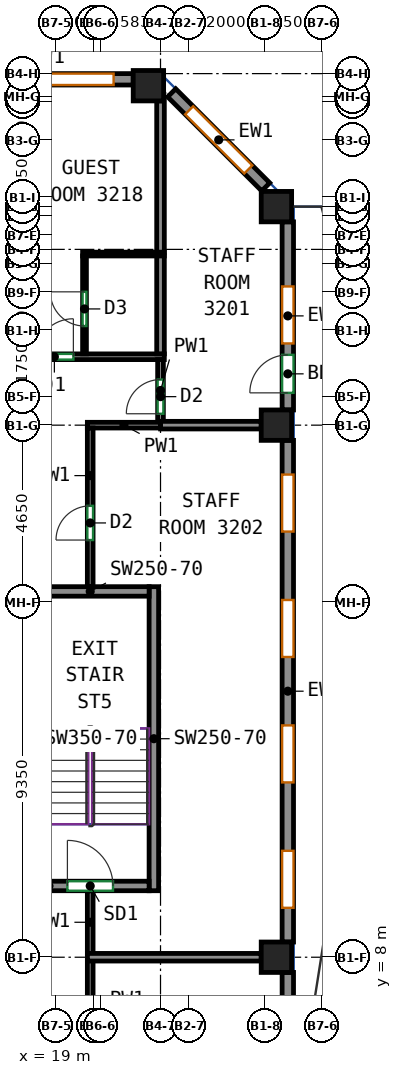
"""IFC4 building model, lengths in metres.
Left out: names, types, materials, properties, quantities, classifications, styles, units other than length and angle.
Written with IfcOpenShell. Run it as: python <this file> out.ifc"""

import sys

from ifc_helpers import new_model, si_unit, direction, frame, frame_2d, origin, origin_2d, place, context, subcontext, project, spatial, rectangle, extrude, source, transform, mapped, element, fill, save


model = new_model("IFC4")
c1 = context("Model", 3, precision=1e-05, world=origin(), true_north=direction((0.0, 1.0)))
c2 = subcontext(c1, "Body", "Model", "MODEL_VIEW")
j1 = project(units=[si_unit("LENGTHUNIT", "METRE"), si_unit("PLANEANGLEUNIT", "RADIAN")], contexts=[c1])
p1 = place(None, origin())
s1 = spatial("IfcSite", under=j1, at=p1, CompositionType="ELEMENT")
p2 = place(p1, origin())
s2 = spatial("IfcBuilding", under=s1, at=p2, CompositionType="ELEMENT")
p3 = place(p2, frame((0.0, 0.0, 143.9)))
s3 = spatial("IfcBuildingStorey", under=s2, at=p3, CompositionType="ELEMENT", Elevation=143.9)
m1 = source(origin(), c2, "Body", "SweptSolid", [
    extrude(rectangle(XDim=0.8, YDim=0.8, at=origin_2d()), origin(), (0.0, 0.0, 1.0), 3.12),
])
for number, where, z_axis, x_axis in (
    (1, (21.432, 30.932, 0.0), (0.0, 0.0, 1.0), (1.0, 0.0, 0.0)),
    (2, (24.8, 8.0, 0.0), (0.0, 0.0, 1.0), (1.0, 0.0, 0.0)),
    (3, (24.8, 22.0, 0.0), (0.0, 0.0, 1.0), (1.0, 0.0, 0.0)),
    (4, (24.8, 27.75, 0.0), (0.0, 0.0, 1.0), (1.0, 0.0, 0.0)),
):
    element("IfcColumn", number, at=place(p3, frame(where, z_axis=z_axis, x_axis=x_axis)), inside=s3, PredefinedType="COLUMN", context=c2, shape_type="MappedRepresentation", body=[
        mapped(m1, transform((0.0, 0.0, 0.0))),
    ])
m2 = source(origin(), c2, "Body", "SweptSolid", [
    extrude(rectangle(XDim=8.0, YDim=0.25, at=frame_2d((4.0, 0.0))), origin(), (0.0, 0.0, 1.0), 3.12),
])
p4 = place(p3, frame((21.575, 9.75, 0.0), z_axis=(0.0, 0.0, 1.0), x_axis=(0.0, 1.0, 0.0)))
e5 = element("IfcWall", 5, at=p4, inside=s3, PredefinedType="SHEAR", context=c2, shape_type="MappedRepresentation", body=[
    mapped(m2, transform((0.0, 0.0, 0.0))),
])
m3 = source(origin(), c2, "Body", "SweptSolid", [
    extrude(rectangle(XDim=3.1, YDim=0.25, at=frame_2d((1.55, 0.0))), origin(), (0.0, 0.0, 1.0), 3.12),
])
p5 = place(p3, frame((18.35, 9.875, 0.0), z_axis=(0.0, 0.0, 1.0), x_axis=(1.0, 0.0, 0.0)))
e6 = element("IfcWall", 6, at=p5, inside=s3, PredefinedType="SHEAR", context=c2, shape_type="MappedRepresentation", body=[
    mapped(m3, transform((0.0, 0.0, 0.0))),
])
p6 = place(p5, frame((0.95, 0.0, 0.0)))
e7 = element("IfcOpeningElement", 7, at=p6, cuts=e6, PredefinedType="OPENING", context=c2, shape_type="SweptSolid", body=[
    extrude(rectangle(XDim=1.2, YDim=2.1, at=frame_2d((0.6, 1.05))), frame((0.0, 0.135, 0.0), z_axis=(0.0, -1.0, 0.0), x_axis=(1.0, 0.0, 0.0)), (0.0, 0.0, 1.0), 0.27),
])
p7 = place(p3, frame((18.35, 17.625, 0.0), z_axis=(0.0, 0.0, 1.0), x_axis=(1.0, 0.0, 0.0)))
e8 = element("IfcWall", 8, at=p7, inside=s3, PredefinedType="SHEAR", context=c2, shape_type="MappedRepresentation", body=[
    mapped(m3, transform((0.0, 0.0, 0.0))),
])
m4 = source(origin(), c2, "Body", "SweptSolid", [
    extrude(rectangle(XDim=6.513, YDim=0.3, at=frame_2d((3.256, 0.0))), origin(), (0.0, 0.0, 1.0), 3.12),
])
p8 = place(p3, frame((25.1, 1.087, 0.0), z_axis=(0.0, 0.0, 1.0), x_axis=(0.0, 1.0, 0.0)))
e9 = element("IfcWall", 9, at=p8, inside=s3, PredefinedType="SOLIDWALL", context=c2, shape_type="MappedRepresentation", body=[
    mapped(m4, transform((0.0, 0.0, 0.0))),
])
p9 = place(p8, frame((0.878, 0.0, 0.85)))
e10 = element("IfcOpeningElement", 10, at=p9, cuts=e9, PredefinedType="OPENING", context=c2, shape_type="SweptSolid", body=[
    extrude(rectangle(XDim=1.5, YDim=1.95, at=frame_2d((0.75, 0.975))), frame((0.0, 0.16, 0.0), z_axis=(0.0, -1.0, 0.0), x_axis=(1.0, 0.0, 0.0)), (0.0, 0.0, 1.0), 0.32),
])
p10 = place(p8, frame((4.135, 0.0, 0.85)))
e11 = element("IfcOpeningElement", 11, at=p10, cuts=e9, PredefinedType="OPENING", context=c2, shape_type="SweptSolid", body=[
    extrude(rectangle(XDim=1.5, YDim=1.95, at=frame_2d((0.75, 0.975))), frame((0.0, 0.16, 0.0), z_axis=(0.0, -1.0, 0.0), x_axis=(1.0, 0.0, 0.0)), (0.0, 0.0, 1.0), 0.32),
])
m5 = source(origin(), c2, "Body", "SweptSolid", [
    extrude(rectangle(XDim=13.2, YDim=0.3, at=frame_2d((6.6, 0.0))), origin(), (0.0, 0.0, 1.0), 3.12),
])
p11 = place(p3, frame((25.1, 8.4, 0.0), z_axis=(0.0, 0.0, 1.0), x_axis=(0.0, 1.0, 0.0)))
e12 = element("IfcWall", 12, at=p11, inside=s3, PredefinedType="SOLIDWALL", context=c2, shape_type="MappedRepresentation", body=[
    mapped(m5, transform((0.0, 0.0, 0.0))),
])
p12 = place(p11, frame((0.9, 0.0, 0.85)))
e13 = element("IfcOpeningElement", 13, at=p12, cuts=e12, PredefinedType="OPENING", context=c2, shape_type="SweptSolid", body=[
    extrude(rectangle(XDim=1.5, YDim=1.95, at=frame_2d((0.75, 0.975))), frame((0.0, 0.16, 0.0), z_axis=(0.0, -1.0, 0.0), x_axis=(1.0, 0.0, 0.0)), (0.0, 0.0, 1.0), 0.32),
])
p13 = place(p11, frame((4.2, 0.0, 0.85)))
e14 = element("IfcOpeningElement", 14, at=p13, cuts=e12, PredefinedType="OPENING", context=c2, shape_type="SweptSolid", body=[
    extrude(rectangle(XDim=1.5, YDim=1.95, at=frame_2d((0.75, 0.975))), frame((0.0, 0.16, 0.0), z_axis=(0.0, -1.0, 0.0), x_axis=(1.0, 0.0, 0.0)), (0.0, 0.0, 1.0), 0.32),
])
p14 = place(p11, frame((7.5, 0.0, 0.85)))
e15 = element("IfcOpeningElement", 15, at=p14, cuts=e12, PredefinedType="OPENING", context=c2, shape_type="SweptSolid", body=[
    extrude(rectangle(XDim=1.5, YDim=1.95, at=frame_2d((0.75, 0.975))), frame((0.0, 0.16, 0.0), z_axis=(0.0, -1.0, 0.0), x_axis=(1.0, 0.0, 0.0)), (0.0, 0.0, 1.0), 0.32),
])
p15 = place(p11, frame((10.8, 0.0, 0.85)))
e16 = element("IfcOpeningElement", 16, at=p15, cuts=e12, PredefinedType="OPENING", context=c2, shape_type="SweptSolid", body=[
    extrude(rectangle(XDim=1.5, YDim=1.95, at=frame_2d((0.75, 0.975))), frame((0.0, 0.16, 0.0), z_axis=(0.0, -1.0, 0.0), x_axis=(1.0, 0.0, 0.0)), (0.0, 0.0, 1.0), 0.32),
])
m6 = source(origin(), c2, "Body", "SweptSolid", [
    extrude(rectangle(XDim=4.95, YDim=0.3, at=frame_2d((2.475, 0.0))), origin(), (0.0, 0.0, 1.0), 3.12),
])
p16 = place(p3, frame((25.1, 22.4, 0.0), z_axis=(0.0, 0.0, 1.0), x_axis=(0.0, 1.0, 0.0)))
e17 = element("IfcWall", 17, at=p16, inside=s3, PredefinedType="SOLIDWALL", context=c2, shape_type="MappedRepresentation", body=[
    mapped(m6, transform((0.0, 0.0, 0.0))),
])
p17 = place(p16, frame((1.75, 0.0, 0.85)))
e18 = element("IfcOpeningElement", 18, at=p17, cuts=e17, PredefinedType="OPENING", context=c2, shape_type="SweptSolid", body=[
    extrude(rectangle(XDim=1.5, YDim=1.95, at=frame_2d((0.75, 0.975))), frame((0.0, 0.16, 0.0), z_axis=(0.0, -1.0, 0.0), x_axis=(1.0, 0.0, 0.0)), (0.0, 0.0, 1.0), 0.32),
])
p18 = place(p16, frame((0.45, 0.0, 0.0)))
e19 = element("IfcOpeningElement", 19, at=p18, cuts=e17, PredefinedType="OPENING", context=c2, shape_type="SweptSolid", body=[
    extrude(rectangle(XDim=1.0, YDim=2.1, at=frame_2d((0.5, 1.05))), frame((0.0, 0.16, 0.0), z_axis=(0.0, -1.0, 0.0), x_axis=(1.0, 0.0, 0.0)), (0.0, 0.0, 1.0), 0.32),
])
m7 = source(origin(), c2, "Body", "SweptSolid", [
    extrude(rectangle(XDim=3.5, YDim=0.3, at=frame_2d((1.75, 0.0))), origin(), (0.0, 0.0, 1.0), 3.12),
])
p19 = place(p3, frame((24.519, 28.269, 0.0), z_axis=(0.0, 0.0, 1.0), x_axis=(-0.70707190453, 0.707141656123, 0.0)))
e20 = element("IfcWall", 20, at=p19, inside=s3, PredefinedType="SOLIDWALL", context=c2, shape_type="MappedRepresentation", body=[
    mapped(m7, transform((0.0, 0.0, 0.0))),
])
p20 = place(p19, frame((0.65, 0.0, 0.85)))
e21 = element("IfcOpeningElement", 21, at=p20, cuts=e20, PredefinedType="OPENING", context=c2, shape_type="SweptSolid", body=[
    extrude(rectangle(XDim=2.2, YDim=1.95, at=frame_2d((1.1, 0.975))), frame((0.0, 0.16, 0.0), z_axis=(0.0, -1.0, 0.0), x_axis=(1.0, 0.0, 0.0)), (0.0, 0.0, 1.0), 0.32),
])
m8 = source(origin(), c2, "Body", "SweptSolid", [
    extrude(rectangle(XDim=6.465, YDim=0.3, at=frame_2d((3.232, 0.0))), origin(), (0.0, 0.0, 1.0), 3.12),
])
p21 = place(p3, frame((21.032, 31.1, 0.0), z_axis=(0.0, 0.0, 1.0), x_axis=(-1.0, 0.0, 0.0)))
e22 = element("IfcWall", 22, at=p21, inside=s3, PredefinedType="SOLIDWALL", context=c2, shape_type="MappedRepresentation", body=[
    mapped(m8, transform((0.0, 0.0, 0.0))),
])
p22 = place(p21, frame((0.516, 0.0, 0.85)))
e23 = element("IfcOpeningElement", 23, at=p22, cuts=e22, PredefinedType="OPENING", context=c2, shape_type="SweptSolid", body=[
    extrude(rectangle(XDim=2.2, YDim=1.95, at=frame_2d((1.1, 0.975))), frame((0.0, 0.16, 0.0), z_axis=(0.0, -1.0, 0.0), x_axis=(1.0, 0.0, 0.0)), (0.0, 0.0, 1.0), 0.32),
])
p23 = place(p21, frame((3.749, 0.0, 0.85)))
e24 = element("IfcOpeningElement", 24, at=p23, cuts=e22, PredefinedType="OPENING", context=c2, shape_type="SweptSolid", body=[
    extrude(rectangle(XDim=2.2, YDim=1.95, at=frame_2d((1.1, 0.975))), frame((0.0, 0.16, 0.0), z_axis=(0.0, -1.0, 0.0), x_axis=(1.0, 0.0, 0.0)), (0.0, 0.0, 1.0), 0.32),
])
p24 = place(p3, frame((-20.059, 23.8, 0.0), z_axis=(0.0, 0.0, 1.0), x_axis=(1.0, 0.0, 0.0)))
e25 = element("IfcWall", 25, at=p24, inside=s3, PredefinedType="PARTITIONING", context=c2, shape_type="SweptSolid", body=[
    extrude(rectangle(XDim=41.909, YDim=0.15, at=frame_2d((20.955, 0.0))), origin(), (0.0, 0.0, 1.0), 3.12),
])
p25 = place(p24, frame((0.401, 0.0, 0.0)))
e26 = element("IfcOpeningElement", 26, at=p25, cuts=e25, PredefinedType="OPENING", context=c2, shape_type="SweptSolid", body=[
    extrude(rectangle(XDim=1.0, YDim=2.1, at=frame_2d((0.5, 1.05))), frame((0.0, 0.085, 0.0), z_axis=(0.0, -1.0, 0.0), x_axis=(1.0, 0.0, 0.0)), (0.0, 0.0, 1.0), 0.17),
])
p26 = place(p24, frame((6.082, 0.0, 0.0)))
e27 = element("IfcOpeningElement", 27, at=p26, cuts=e25, PredefinedType="OPENING", context=c2, shape_type="SweptSolid", body=[
    extrude(rectangle(XDim=1.0, YDim=2.1, at=frame_2d((0.5, 1.05))), frame((0.0, 0.085, 0.0), z_axis=(0.0, -1.0, 0.0), x_axis=(1.0, 0.0, 0.0)), (0.0, 0.0, 1.0), 0.17),
])
p27 = place(p24, frame((8.08, 0.0, 0.0)))
e28 = element("IfcOpeningElement", 28, at=p27, cuts=e25, PredefinedType="OPENING", context=c2, shape_type="SweptSolid", body=[
    extrude(rectangle(XDim=1.0, YDim=2.1, at=frame_2d((0.5, 1.05))), frame((0.0, 0.085, 0.0), z_axis=(0.0, -1.0, 0.0), x_axis=(1.0, 0.0, 0.0)), (0.0, 0.0, 1.0), 0.17),
])
p28 = place(p24, frame((13.769, 0.0, 0.0)))
e29 = element("IfcOpeningElement", 29, at=p28, cuts=e25, PredefinedType="OPENING", context=c2, shape_type="SweptSolid", body=[
    extrude(rectangle(XDim=1.0, YDim=2.1, at=frame_2d((0.5, 1.05))), frame((0.0, 0.085, 0.0), z_axis=(0.0, -1.0, 0.0), x_axis=(1.0, 0.0, 0.0)), (0.0, 0.0, 1.0), 0.17),
])
p29 = place(p24, frame((15.56, 0.0, 0.0)))
e30 = element("IfcOpeningElement", 30, at=p29, cuts=e25, PredefinedType="OPENING", context=c2, shape_type="SweptSolid", body=[
    extrude(rectangle(XDim=1.0, YDim=2.1, at=frame_2d((0.5, 1.05))), frame((0.0, 0.085, 0.0), z_axis=(0.0, -1.0, 0.0), x_axis=(1.0, 0.0, 0.0)), (0.0, 0.0, 1.0), 0.17),
])
p30 = place(p24, frame((21.625, 0.0, 0.0)))
e31 = element("IfcOpeningElement", 31, at=p30, cuts=e25, PredefinedType="OPENING", context=c2, shape_type="SweptSolid", body=[
    extrude(rectangle(XDim=1.0, YDim=2.1, at=frame_2d((0.5, 1.05))), frame((0.0, 0.085, 0.0), z_axis=(0.0, -1.0, 0.0), x_axis=(1.0, 0.0, 0.0)), (0.0, 0.0, 1.0), 0.17),
])
p31 = place(p24, frame((23.212, 0.0, 0.0)))
e32 = element("IfcOpeningElement", 32, at=p31, cuts=e25, PredefinedType="OPENING", context=c2, shape_type="SweptSolid", body=[
    extrude(rectangle(XDim=1.0, YDim=2.1, at=frame_2d((0.5, 1.05))), frame((0.0, 0.085, 0.0), z_axis=(0.0, -1.0, 0.0), x_axis=(1.0, 0.0, 0.0)), (0.0, 0.0, 1.0), 0.17),
])
p32 = place(p24, frame((29.038, 0.0, 0.0)))
e33 = element("IfcOpeningElement", 33, at=p32, cuts=e25, PredefinedType="OPENING", context=c2, shape_type="SweptSolid", body=[
    extrude(rectangle(XDim=1.0, YDim=2.1, at=frame_2d((0.5, 1.05))), frame((0.0, 0.085, 0.0), z_axis=(0.0, -1.0, 0.0), x_axis=(1.0, 0.0, 0.0)), (0.0, 0.0, 1.0), 0.17),
])
p33 = place(p24, frame((30.624, 0.0, 0.0)))
e34 = element("IfcOpeningElement", 34, at=p33, cuts=e25, PredefinedType="OPENING", context=c2, shape_type="SweptSolid", body=[
    extrude(rectangle(XDim=1.0, YDim=2.1, at=frame_2d((0.5, 1.05))), frame((0.0, 0.085, 0.0), z_axis=(0.0, -1.0, 0.0), x_axis=(1.0, 0.0, 0.0)), (0.0, 0.0, 1.0), 0.17),
])
p34 = place(p24, frame((36.622, 0.0, 0.0)))
e35 = element("IfcOpeningElement", 35, at=p34, cuts=e25, PredefinedType="OPENING", context=c2, shape_type="SweptSolid", body=[
    extrude(rectangle(XDim=1.0, YDim=2.1, at=frame_2d((0.5, 1.05))), frame((0.0, 0.085, 0.0), z_axis=(0.0, -1.0, 0.0), x_axis=(1.0, 0.0, 0.0)), (0.0, 0.0, 1.0), 0.17),
])
p35 = place(p24, frame((38.516, 0.0, 0.0)))
e36 = element("IfcOpeningElement", 36, at=p35, cuts=e25, PredefinedType="OPENING", context=c2, shape_type="SweptSolid", body=[
    extrude(rectangle(XDim=1.0, YDim=2.1, at=frame_2d((0.5, 1.05))), frame((0.0, 0.085, 0.0), z_axis=(0.0, -1.0, 0.0), x_axis=(1.0, 0.0, 0.0)), (0.0, 0.0, 1.0), 0.17),
])
p36 = place(p3, frame((21.75, 22.1, 0.0), z_axis=(0.0, 0.0, 1.0), x_axis=(0.0, 1.0, 0.0)))
e37 = element("IfcWall", 37, at=p36, inside=s3, PredefinedType="PARTITIONING", context=c2, shape_type="SweptSolid", body=[
    extrude(rectangle(XDim=1.625, YDim=0.15, at=frame_2d((0.812, 0.0))), origin(), (0.0, 0.0, 1.0), 3.12),
])
p37 = place(p36, frame((0.2, 0.0, 0.0)))
e38 = element("IfcOpeningElement", 38, at=p37, cuts=e37, PredefinedType="OPENING", context=c2, shape_type="SweptSolid", body=[
    extrude(rectangle(XDim=0.9, YDim=2.1, at=frame_2d((0.45, 1.05))), frame((0.0, 0.085, 0.0), z_axis=(0.0, -1.0, 0.0), x_axis=(1.0, 0.0, 0.0)), (0.0, 0.0, 1.0), 0.17),
])
p38 = place(p3, frame((19.9, 4.434, 0.0), z_axis=(0.0, 0.0, 1.0), x_axis=(0.0, 1.0, 0.0)))
e39 = element("IfcWall", 39, at=p38, inside=s3, PredefinedType="PARTITIONING", context=c2, shape_type="SweptSolid", body=[
    extrude(rectangle(XDim=3.476, YDim=0.15, at=frame_2d((1.738, 0.0))), origin(), (0.0, 0.0, 1.0), 3.12),
])
p39 = place(p38, frame((0.927, 0.0, 0.0)))
e40 = element("IfcOpeningElement", 40, at=p39, cuts=e39, PredefinedType="OPENING", context=c2, shape_type="SweptSolid", body=[
    extrude(rectangle(XDim=1.0, YDim=2.1, at=frame_2d((0.5, 1.05))), frame((0.0, 0.085, 0.0), z_axis=(0.0, -1.0, 0.0), x_axis=(1.0, 0.0, 0.0)), (0.0, 0.0, 1.0), 0.17),
])
p40 = place(p3, frame((19.825, 22.0, 0.0), z_axis=(0.0, 0.0, 1.0), x_axis=(1.0, 0.0, 0.0)))
e41 = element("IfcWall", 41, at=p40, inside=s3, PredefinedType="PARTITIONING", context=c2, shape_type="SweptSolid", body=[
    extrude(rectangle(XDim=1.925, YDim=0.15, at=frame_2d((0.962, 0.0))), origin(), (0.0, 0.0, 1.0), 3.12),
])
p41 = place(p3, frame((19.9, 17.75, 0.0), z_axis=(0.0, 0.0, 1.0), x_axis=(0.0, 1.0, 0.0)))
e42 = element("IfcWall", 42, at=p41, inside=s3, PredefinedType="PARTITIONING", context=c2, shape_type="SweptSolid", body=[
    extrude(rectangle(XDim=4.175, YDim=0.15, at=frame_2d((2.087, 0.0))), origin(), (0.0, 0.0, 1.0), 3.12),
])
p42 = place(p41, frame((1.227, 0.0, 0.0)))
e43 = element("IfcOpeningElement", 43, at=p42, cuts=e42, PredefinedType="OPENING", context=c2, shape_type="SweptSolid", body=[
    extrude(rectangle(XDim=0.9, YDim=2.1, at=frame_2d((0.45, 1.05))), frame((0.0, 0.085, 0.0), z_axis=(0.0, -1.0, 0.0), x_axis=(1.0, 0.0, 0.0)), (0.0, 0.0, 1.0), 0.17),
])
p43 = place(p3, frame((19.9, 8.09, 0.0), z_axis=(0.0, 0.0, 1.0), x_axis=(0.0, 1.0, 0.0)))
e44 = element("IfcWall", 44, at=p43, inside=s3, PredefinedType="PARTITIONING", context=c2, shape_type="SweptSolid", body=[
    extrude(rectangle(XDim=1.66, YDim=0.15, at=frame_2d((0.83, 0.0))), origin(), (0.0, 0.0, 1.0), 3.12),
])
p44 = place(p3, frame((19.7, 26.502, 0.0), z_axis=(0.0, 0.0, 1.0), x_axis=(1.0, 0.0, 0.0)))
e45 = element("IfcWall", 45, at=p44, inside=s3, PredefinedType="PARTITIONING", context=c2, shape_type="SweptSolid", body=[
    extrude(rectangle(XDim=2.15, YDim=0.1, at=frame_2d((1.075, 0.0))), origin(), (0.0, 0.0, 1.0), 3.12),
])
p45 = place(p3, frame((19.75, 23.877, 0.0), z_axis=(0.0, 0.0, 1.0), x_axis=(0.0, 1.0, 0.0)))
e46 = element("IfcWall", 46, at=p45, inside=s3, PredefinedType="PARTITIONING", context=c2, shape_type="SweptSolid", body=[
    extrude(rectangle(XDim=2.575, YDim=0.1, at=frame_2d((1.288, 0.0))), origin(), (0.0, 0.0, 1.0), 3.12),
])
p46 = place(p45, frame((0.731, 0.0, 0.0)))
e47 = element("IfcOpeningElement", 47, at=p46, cuts=e46, PredefinedType="OPENING", context=c2, shape_type="SweptSolid", body=[
    extrude(rectangle(XDim=0.9, YDim=2.1, at=frame_2d((0.45, 1.05))), frame((0.0, 0.06, 0.0), z_axis=(0.0, -1.0, 0.0), x_axis=(1.0, 0.0, 0.0)), (0.0, 0.0, 1.0), 0.12),
])
p47 = place(p3, frame((21.75, 26.552, 0.0), z_axis=(0.0, 0.0, 1.0), x_axis=(0.0, 1.0, 0.0)))
e48 = element("IfcWall", 48, at=p47, inside=s3, PredefinedType="PARTITIONING", context=c2, shape_type="SweptSolid", body=[
    extrude(rectangle(XDim=3.98, YDim=0.2, at=frame_2d((1.99, 0.0))), origin(), (0.0, 0.0, 1.0), 3.12),
])
p48 = place(p3, frame((21.75, 23.877, 0.0), z_axis=(0.0, 0.0, 1.0), x_axis=(0.0, 1.0, 0.0)))
e49 = element("IfcWall", 49, at=p48, inside=s3, PredefinedType="PARTITIONING", context=c2, shape_type="SweptSolid", body=[
    extrude(rectangle(XDim=2.575, YDim=0.2, at=frame_2d((1.288, 0.0))), origin(), (0.0, 0.0, 1.0), 3.12),
])
p49 = place(p3, frame((21.752, 22.0, 0.0), z_axis=(0.0, 0.0, 1.0), x_axis=(1.0, 0.0, 0.0)))
e50 = element("IfcWall", 50, at=p49, inside=s3, PredefinedType="PARTITIONING", context=c2, shape_type="SweptSolid", body=[
    extrude(rectangle(XDim=2.648, YDim=0.2, at=frame_2d((1.324, 0.0))), origin(), (0.0, 0.0, 1.0), 3.12),
])
p50 = place(p3, frame((19.827, 8.0, 0.0), z_axis=(0.0, 0.0, 1.0), x_axis=(1.0, 0.0, 0.0)))
e51 = element("IfcWall", 51, at=p50, inside=s3, PredefinedType="PARTITIONING", context=c2, shape_type="SweptSolid", body=[
    extrude(rectangle(XDim=4.573, YDim=0.2, at=frame_2d((2.287, 0.0))), origin(), (0.0, 0.0, 1.0), 3.12),
])
p51 = place(p12, origin())
e52 = element("IfcWindow", 52, at=p51, inside=s3, PartitioningType="SINGLE_PANEL", PredefinedType="WINDOW", context=c2, shape_type="SweptSolid", body=[
    extrude(rectangle(XDim=1.5, YDim=1.95, at=frame_2d((0.75, 0.975))), frame((0.0, 0.03, 0.0), z_axis=(0.0, -1.0, 0.0), x_axis=(1.0, 0.0, 0.0)), (0.0, 0.0, 1.0), 0.06),
])
fill(e13, e52)
p52 = place(p13, origin())
e53 = element("IfcWindow", 53, at=p52, inside=s3, PartitioningType="SINGLE_PANEL", PredefinedType="WINDOW", context=c2, shape_type="SweptSolid", body=[
    extrude(rectangle(XDim=1.5, YDim=1.95, at=frame_2d((0.75, 0.975))), frame((0.0, 0.03, 0.0), z_axis=(0.0, -1.0, 0.0), x_axis=(1.0, 0.0, 0.0)), (0.0, 0.0, 1.0), 0.06),
])
fill(e14, e53)
p53 = place(p14, origin())
e54 = element("IfcWindow", 54, at=p53, inside=s3, PartitioningType="SINGLE_PANEL", PredefinedType="WINDOW", context=c2, shape_type="SweptSolid", body=[
    extrude(rectangle(XDim=1.5, YDim=1.95, at=frame_2d((0.75, 0.975))), frame((0.0, 0.03, 0.0), z_axis=(0.0, -1.0, 0.0), x_axis=(1.0, 0.0, 0.0)), (0.0, 0.0, 1.0), 0.06),
])
fill(e15, e54)
p54 = place(p15, origin())
e55 = element("IfcWindow", 55, at=p54, inside=s3, PartitioningType="SINGLE_PANEL", PredefinedType="WINDOW", context=c2, shape_type="SweptSolid", body=[
    extrude(rectangle(XDim=1.5, YDim=1.95, at=frame_2d((0.75, 0.975))), frame((0.0, 0.03, 0.0), z_axis=(0.0, -1.0, 0.0), x_axis=(1.0, 0.0, 0.0)), (0.0, 0.0, 1.0), 0.06),
])
fill(e16, e55)
p55 = place(p17, origin())
e56 = element("IfcWindow", 56, at=p55, inside=s3, PartitioningType="SINGLE_PANEL", PredefinedType="WINDOW", context=c2, shape_type="SweptSolid", body=[
    extrude(rectangle(XDim=1.5, YDim=1.95, at=frame_2d((0.75, 0.975))), frame((0.0, 0.03, 0.0), z_axis=(0.0, -1.0, 0.0), x_axis=(1.0, 0.0, 0.0)), (0.0, 0.0, 1.0), 0.06),
])
fill(e18, e56)
p56 = place(p18, origin())
e57 = element("IfcDoor", 57, at=p56, inside=s3, OperationType="SINGLE_SWING_LEFT", PredefinedType="DOOR", context=c2, shape_type="SweptSolid", body=[
    extrude(rectangle(XDim=1.0, YDim=2.1, at=frame_2d((0.5, 1.05))), frame((0.0, 0.025, 0.0), z_axis=(0.0, -1.0, 0.0), x_axis=(1.0, 0.0, 0.0)), (0.0, 0.0, 1.0), 0.05),
])
fill(e19, e57)
p57 = place(p20, origin())
e58 = element("IfcWindow", 58, at=p57, inside=s3, PartitioningType="SINGLE_PANEL", PredefinedType="WINDOW", context=c2, shape_type="SweptSolid", body=[
    extrude(rectangle(XDim=2.2, YDim=1.95, at=frame_2d((1.1, 0.975))), frame((0.0, 0.03, 0.0), z_axis=(0.0, -1.0, 0.0), x_axis=(1.0, 0.0, 0.0)), (0.0, 0.0, 1.0), 0.06),
])
fill(e21, e58)
p58 = place(p22, origin())
e59 = element("IfcWindow", 59, at=p58, inside=s3, PartitioningType="SINGLE_PANEL", PredefinedType="WINDOW", context=c2, shape_type="SweptSolid", body=[
    extrude(rectangle(XDim=2.2, YDim=1.95, at=frame_2d((1.1, 0.975))), frame((0.0, 0.03, 0.0), z_axis=(0.0, -1.0, 0.0), x_axis=(1.0, 0.0, 0.0)), (0.0, 0.0, 1.0), 0.06),
])
fill(e23, e59)
p59 = place(p6, origin())
e60 = element("IfcDoor", 60, at=p59, inside=s3, OperationType="DOUBLE_DOOR_SINGLE_SWING", PredefinedType="DOOR", context=c2, shape_type="SweptSolid", body=[
    extrude(rectangle(XDim=1.2, YDim=2.1, at=frame_2d((0.6, 1.05))), frame((0.0, 0.025, 0.0), z_axis=(0.0, -1.0, 0.0), x_axis=(1.0, 0.0, 0.0)), (0.0, 0.0, 1.0), 0.05),
])
fill(e7, e60)
p60 = place(p42, origin())
e61 = element("IfcDoor", 61, at=p60, inside=s3, OperationType="SINGLE_SWING_LEFT", PredefinedType="DOOR", context=c2, shape_type="SweptSolid", body=[
    extrude(rectangle(XDim=0.9, YDim=2.1, at=frame_2d((0.45, 1.05))), frame((0.0, 0.025, 0.0), z_axis=(0.0, -1.0, 0.0), x_axis=(1.0, 0.0, 0.0)), (0.0, 0.0, 1.0), 0.05),
])
fill(e43, e61)
p61 = place(p37, origin())
e62 = element("IfcDoor", 62, at=p61, inside=s3, OperationType="SINGLE_SWING_LEFT", PredefinedType="DOOR", context=c2, shape_type="SweptSolid", body=[
    extrude(rectangle(XDim=0.9, YDim=2.1, at=frame_2d((0.45, 1.05))), frame((0.0, 0.025, 0.0), z_axis=(0.0, -1.0, 0.0), x_axis=(1.0, 0.0, 0.0)), (0.0, 0.0, 1.0), 0.05),
])
fill(e38, e62)
p62 = place(p35, origin())
e63 = element("IfcDoor", 63, at=p62, inside=s3, OperationType="SINGLE_SWING_RIGHT", PredefinedType="DOOR", context=c2, shape_type="SweptSolid", body=[
    extrude(rectangle(XDim=1.0, YDim=2.1, at=frame_2d((0.5, 1.05))), frame((0.0, 0.025, 0.0), z_axis=(0.0, -1.0, 0.0), x_axis=(1.0, 0.0, 0.0)), (0.0, 0.0, 1.0), 0.05),
])
fill(e36, e63)
p63 = place(p46, origin())
e64 = element("IfcDoor", 64, at=p63, inside=s3, OperationType="SINGLE_SWING_RIGHT", PredefinedType="DOOR", context=c2, shape_type="SweptSolid", body=[
    extrude(rectangle(XDim=0.9, YDim=2.1, at=frame_2d((0.45, 1.05))), frame((0.0, 0.025, 0.0), z_axis=(0.0, -1.0, 0.0), x_axis=(1.0, 0.0, 0.0)), (0.0, 0.0, 1.0), 0.05),
])
fill(e47, e64)
save(model, sys.argv[1])
